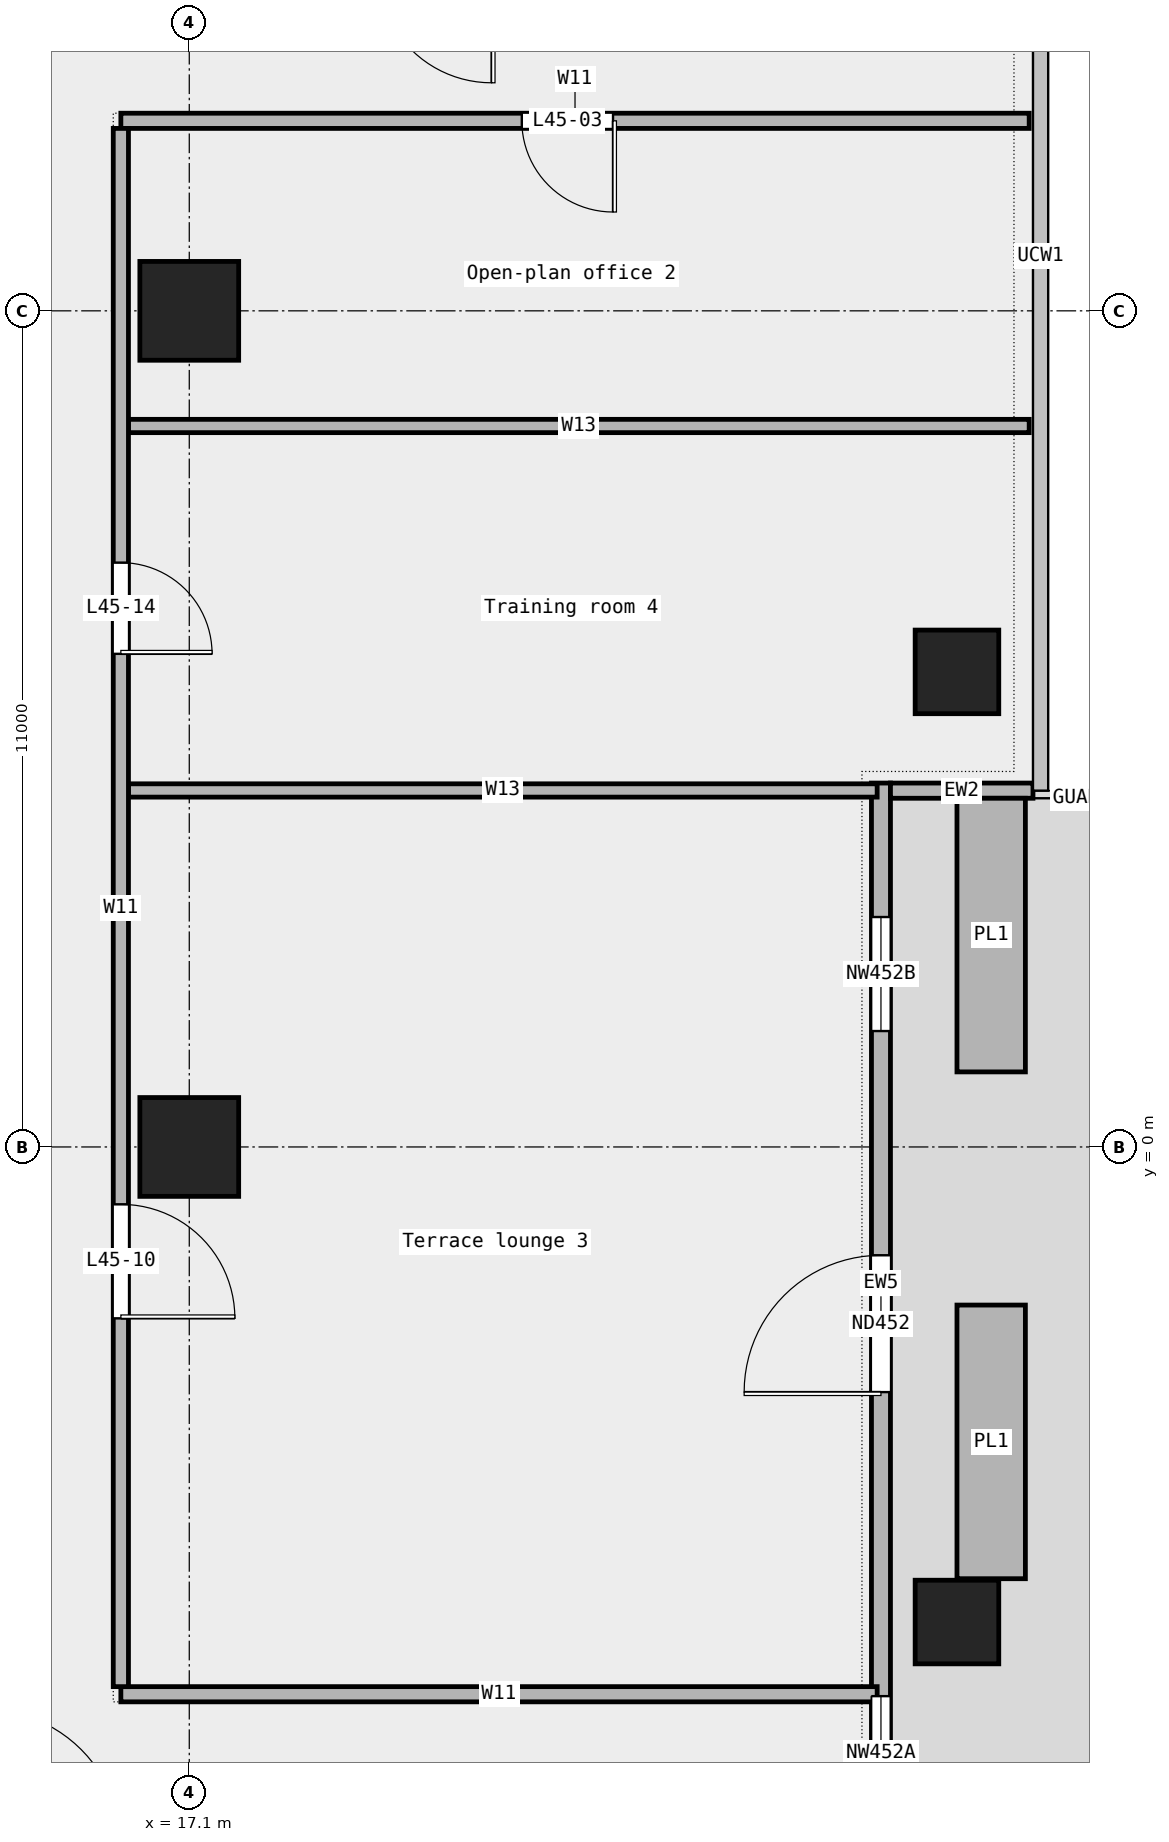
"""IFC4 building model, lengths in metres.
Left out: names, types, materials, properties, quantities, classifications, styles, units other than length and angle.
Written with IfcOpenShell. Run it as: python <this file> out.ifc"""

import sys

from ifc_helpers import new_model, si_unit, direction, frame, frame_2d, origin, origin_2d, place, context, subcontext, project, spatial, rectangle, extrude, element, fill, save


model = new_model("IFC4")
c1 = context("Model", 3, precision=1e-05, world=origin(), true_north=direction((0.0, 1.0)))
c2 = subcontext(c1, "Body", "Model", "MODEL_VIEW")
j1 = project(units=[si_unit("LENGTHUNIT", "METRE"), si_unit("PLANEANGLEUNIT", "RADIAN")], contexts=[c1])
p1 = place(None, origin())
s1 = spatial("IfcSite", under=j1, at=p1, CompositionType="ELEMENT")
p2 = place(p1, origin())
s2 = spatial("IfcBuilding", under=s1, at=p2, CompositionType="ELEMENT")
p3 = place(p2, frame((0.0, 0.0, 215.0)))
s3 = spatial("IfcBuildingStorey", under=s2, at=p3, CompositionType="ELEMENT", Elevation=215.0)
for number, where, z_axis, x_axis in (
    (1, (27.2, -6.25, 0.0), (0.0, 0.0, 1.0), (1.0, 0.0, 0.0)),
    (2, (27.2, 6.25, 0.0), (0.0, 0.0, 1.0), (1.0, 0.0, 0.0)),
):
    element("IfcColumn", number, at=place(p3, frame(where, z_axis=z_axis, x_axis=x_axis)), inside=s3, PredefinedType="COLUMN", context=c2, shape_type="SweptSolid", body=[
        extrude(rectangle(XDim=1.1, YDim=1.1, at=origin_2d()), origin(), (0.0, 0.0, 1.0), 3.6),
    ])
for number, where, z_axis, x_axis in (
    (3, (17.1, 0.0, 0.0), (0.0, 0.0, 1.0), (1.0, 0.0, 0.0)),
    (4, (17.1, 11.0, 0.0), (0.0, 0.0, 1.0), (1.0, 0.0, 0.0)),
):
    element("IfcColumn", number, at=place(p3, frame(where, z_axis=z_axis, x_axis=x_axis)), inside=s3, PredefinedType="COLUMN", context=c2, shape_type="SweptSolid", body=[
        extrude(rectangle(XDim=1.3, YDim=1.3, at=origin_2d()), origin(), (0.0, 0.0, 1.0), 3.6),
    ])
p4 = place(p3, frame((26.2, -9.475, 0.0), z_axis=(0.0, 0.0, 1.0), x_axis=(0.0, 1.0, 0.0)))
e5 = element("IfcWall", 5, at=p4, inside=s3, PredefinedType="STANDARD", context=c2, shape_type="SweptSolid", body=[
    extrude(rectangle(XDim=14.263, YDim=0.25, at=frame_2d((7.131, 0.0))), origin(), (0.0, 0.0, 1.0), 3.6),
])
p5 = place(p4, frame((0.75, 0.0, 0.45)))
e6 = element("IfcOpeningElement", 6, at=p5, cuts=e5, PredefinedType="OPENING", context=c2, shape_type="SweptSolid", body=[
    extrude(rectangle(XDim=1.5, YDim=2.4, at=frame_2d((0.75, 1.2))), frame((0.0, 0.137, 0.0), z_axis=(0.0, -1.0, 0.0), x_axis=(1.0, 0.0, 0.0)), (0.0, 0.0, 1.0), 0.274),
])
p6 = place(p4, frame((6.25, 0.0, 0.0)))
e7 = element("IfcOpeningElement", 7, at=p6, cuts=e5, PredefinedType="OPENING", context=c2, shape_type="SweptSolid", body=[
    extrude(rectangle(XDim=1.8, YDim=2.4, at=frame_2d((0.9, 1.2))), frame((0.0, 0.137, 0.0), z_axis=(0.0, -1.0, 0.0), x_axis=(1.0, 0.0, 0.0)), (0.0, 0.0, 1.0), 0.274),
])
p7 = place(p4, frame((11.0, 0.0, 0.45)))
e8 = element("IfcOpeningElement", 8, at=p7, cuts=e5, PredefinedType="OPENING", context=c2, shape_type="SweptSolid", body=[
    extrude(rectangle(XDim=1.5, YDim=2.4, at=frame_2d((0.75, 1.2))), frame((0.0, 0.137, 0.0), z_axis=(0.0, -1.0, 0.0), x_axis=(1.0, 0.0, 0.0)), (0.0, 0.0, 1.0), 0.274),
])
p8 = place(p3, frame((28.2, 4.688, 0.0), z_axis=(0.0, 0.0, 1.0), x_axis=(-1.0, 0.0, 0.0)))
e9 = element("IfcWall", 9, at=p8, inside=s3, PredefinedType="STANDARD", context=c2, shape_type="SweptSolid", body=[
    extrude(rectangle(XDim=1.875, YDim=0.2, at=frame_2d((0.938, 0.0))), origin(), (0.0, 0.0, 1.0), 3.6),
])
for number, where, z_axis, x_axis in (
    (10, (27.65, -5.68, 0.0), (0.0, 0.0, 1.0), (0.0, 1.0, 0.0)),
    (11, (27.65, 0.988, 0.0), (0.0, 0.0, 1.0), (0.0, 1.0, 0.0)),
):
    element("IfcWall", number, at=place(p3, frame(where, z_axis=z_axis, x_axis=x_axis)), inside=s3, PredefinedType="STANDARD", context=c2, shape_type="SweptSolid", body=[
        extrude(rectangle(XDim=3.6, YDim=0.9, at=frame_2d((1.8, 0.0))), origin(), (0.0, 0.0, 1.0), 0.7),
    ])
p9 = place(p3, frame((16.2, -7.2, 0.0), z_axis=(0.0, 0.0, 1.0), x_axis=(1.0, 0.0, 0.0)))
e12 = element("IfcWall", 12, at=p9, inside=s3, PredefinedType="PARTITIONING", context=c2, shape_type="SweptSolid", body=[
    extrude(rectangle(XDim=9.95, YDim=0.2, at=frame_2d((4.975, 0.0))), origin(), (0.0, 0.0, 1.0), 3.6),
])
p10 = place(p3, frame((16.3, 4.69, 0.0), z_axis=(0.0, 0.0, 1.0), x_axis=(1.0, 0.0, 0.0)))
e13 = element("IfcWall", 13, at=p10, inside=s3, PredefinedType="PARTITIONING", context=c2, shape_type="SweptSolid", body=[
    extrude(rectangle(XDim=9.85, YDim=0.175, at=frame_2d((4.925, 0.0))), origin(), (0.0, 0.0, 1.0), 3.6),
])
p11 = place(p3, frame((16.3, 9.485, 0.0), z_axis=(0.0, 0.0, 1.0), x_axis=(1.0, 0.0, 0.0)))
e14 = element("IfcWall", 14, at=p11, inside=s3, PredefinedType="PARTITIONING", context=c2, shape_type="SweptSolid", body=[
    extrude(rectangle(XDim=11.85, YDim=0.175, at=frame_2d((5.925, 0.0))), origin(), (0.0, 0.0, 1.0), 3.6),
])
p12 = place(p3, frame((16.2, 13.5, 0.0), z_axis=(0.0, 0.0, 1.0), x_axis=(1.0, 0.0, 0.0)))
e15 = element("IfcWall", 15, at=p12, inside=s3, PredefinedType="PARTITIONING", context=c2, shape_type="SweptSolid", body=[
    extrude(rectangle(XDim=11.95, YDim=0.2, at=frame_2d((5.975, 0.0))), origin(), (0.0, 0.0, 1.0), 3.6),
])
p13 = place(p12, frame((5.275, 0.0, 0.0)))
e16 = element("IfcOpeningElement", 16, at=p13, cuts=e15, PredefinedType="OPENING", context=c2, shape_type="SweptSolid", body=[
    extrude(rectangle(XDim=1.2, YDim=2.1, at=frame_2d((0.6, 1.05))), frame((0.0, 0.112, 0.0), z_axis=(0.0, -1.0, 0.0), x_axis=(1.0, 0.0, 0.0)), (0.0, 0.0, 1.0), 0.224),
])
p14 = place(p3, frame((16.2, -7.1, 0.0), z_axis=(0.0, 0.0, 1.0), x_axis=(0.0, 1.0, 0.0)))
e17 = element("IfcWall", 17, at=p14, inside=s3, PredefinedType="PARTITIONING", context=c2, shape_type="SweptSolid", body=[
    extrude(rectangle(XDim=20.5, YDim=0.2, at=frame_2d((10.25, 0.0))), origin(), (0.0, 0.0, 1.0), 3.6),
])
p15 = place(p14, frame((4.845, 0.0, 0.0)))
e18 = element("IfcOpeningElement", 18, at=p15, cuts=e17, PredefinedType="OPENING", context=c2, shape_type="SweptSolid", body=[
    extrude(rectangle(XDim=1.5, YDim=2.1, at=frame_2d((0.75, 1.05))), frame((0.0, 0.112, 0.0), z_axis=(0.0, -1.0, 0.0), x_axis=(1.0, 0.0, 0.0)), (0.0, 0.0, 1.0), 0.224),
])
p16 = place(p14, frame((13.587, 0.0, 0.0)))
e19 = element("IfcOpeningElement", 19, at=p16, cuts=e17, PredefinedType="OPENING", context=c2, shape_type="SweptSolid", body=[
    extrude(rectangle(XDim=1.2, YDim=2.1, at=frame_2d((0.6, 1.05))), frame((0.0, 0.112, 0.0), z_axis=(0.0, -1.0, 0.0), x_axis=(1.0, 0.0, 0.0)), (0.0, 0.0, 1.0), 0.224),
])
p17 = place(p5, origin())
e20 = element("IfcWindow", 20, at=p17, inside=s3, PartitioningType="SINGLE_PANEL", PredefinedType="WINDOW", context=c2, shape_type="SweptSolid", body=[
    extrude(rectangle(XDim=1.5, YDim=2.4, at=frame_2d((0.75, 1.2))), frame((0.0, 0.03, 0.0), z_axis=(0.0, -1.0, 0.0), x_axis=(1.0, 0.0, 0.0)), (0.0, 0.0, 1.0), 0.06),
])
fill(e6, e20)
p18 = place(p6, origin())
e21 = element("IfcDoor", 21, at=p18, inside=s3, OperationType="DOUBLE_DOOR_SINGLE_SWING", PredefinedType="DOOR", context=c2, shape_type="SweptSolid", body=[
    extrude(rectangle(XDim=1.8, YDim=2.4, at=frame_2d((0.9, 1.2))), frame((0.0, 0.025, 0.0), z_axis=(0.0, -1.0, 0.0), x_axis=(1.0, 0.0, 0.0)), (0.0, 0.0, 1.0), 0.05),
])
fill(e7, e21)
p19 = place(p7, origin())
e22 = element("IfcWindow", 22, at=p19, inside=s3, PartitioningType="SINGLE_PANEL", PredefinedType="WINDOW", context=c2, shape_type="SweptSolid", body=[
    extrude(rectangle(XDim=1.5, YDim=2.4, at=frame_2d((0.75, 1.2))), frame((0.0, 0.03, 0.0), z_axis=(0.0, -1.0, 0.0), x_axis=(1.0, 0.0, 0.0)), (0.0, 0.0, 1.0), 0.06),
])
fill(e8, e22)
p20 = place(p13, origin())
e23 = element("IfcDoor", 23, at=p20, inside=s3, OperationType="SINGLE_SWING_LEFT", PredefinedType="DOOR", context=c2, shape_type="SweptSolid", body=[
    extrude(rectangle(XDim=1.2, YDim=2.1, at=frame_2d((0.6, 1.05))), frame((0.0, 0.025, 0.0), z_axis=(0.0, -1.0, 0.0), x_axis=(1.0, 0.0, 0.0)), (0.0, 0.0, 1.0), 0.05),
])
fill(e16, e23)
p21 = place(p15, origin())
e24 = element("IfcDoor", 24, at=p21, inside=s3, OperationType="DOUBLE_DOOR_SINGLE_SWING", PredefinedType="DOOR", context=c2, shape_type="SweptSolid", body=[
    extrude(rectangle(XDim=1.5, YDim=2.1, at=frame_2d((0.75, 1.05))), frame((0.0, 0.025, 0.0), z_axis=(0.0, -1.0, 0.0), x_axis=(1.0, 0.0, 0.0)), (0.0, 0.0, 1.0), 0.05),
])
fill(e18, e24)
p22 = place(p16, origin())
e25 = element("IfcDoor", 25, at=p22, inside=s3, OperationType="SINGLE_SWING_RIGHT", PredefinedType="DOOR", context=c2, shape_type="SweptSolid", body=[
    extrude(rectangle(XDim=1.2, YDim=2.1, at=frame_2d((0.6, 1.05))), frame((0.0, 0.025, 0.0), z_axis=(0.0, -1.0, 0.0), x_axis=(1.0, 0.0, 0.0)), (0.0, 0.0, 1.0), 0.05),
])
fill(e19, e25)
save(model, sys.argv[1])
